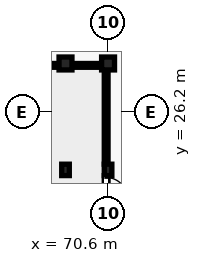
"""IFC4 building model, lengths in metres.
Left out: names, types, materials, properties, quantities, classifications, styles, units other than length and angle.
Written with IfcOpenShell. Run it as: python <this file> out.ifc"""

import sys

from ifc_helpers import new_model, si_unit, direction, frame, frame_2d, origin, origin_2d, place, context, subcontext, project, spatial, rectangle, extrude, element, fill, save


model = new_model("IFC4")
c1 = context("Model", 3, precision=1e-05, world=origin(), true_north=direction((0.0, 1.0)))
c2 = subcontext(c1, "Body", "Model", "MODEL_VIEW")
j1 = project(units=[si_unit("LENGTHUNIT", "METRE"), si_unit("PLANEANGLEUNIT", "RADIAN")], contexts=[c1])
p1 = place(None, origin())
s1 = spatial("IfcSite", under=j1, at=p1, CompositionType="ELEMENT")
p2 = place(p1, origin())
s2 = spatial("IfcBuilding", under=s1, at=p2, CompositionType="ELEMENT")
p3 = place(p2, origin())
s3 = spatial("IfcBuildingStorey", under=s2, at=p3, CompositionType="ELEMENT", Elevation=0.0)
p4 = place(p3, frame((67.8, 29.4, 0.0), z_axis=(0.0, 0.0, 1.0), x_axis=(1.0, 0.0, 0.0)))
e1 = element("IfcColumn", 1, at=p4, inside=s3, PredefinedType="COLUMN", context=c2, shape_type="SweptSolid", body=[
    extrude(rectangle(XDim=0.85, YDim=0.85, at=origin_2d()), origin(), (0.0, 0.0, 1.0), 4.15),
])
p5 = place(p3, frame((67.8, 22.4, 0.0), z_axis=(0.0, 0.0, 1.0), x_axis=(1.0, 0.0, 0.0)))
e2 = element("IfcColumn", 2, at=p5, inside=s3, PredefinedType="COLUMN", context=c2, shape_type="SweptSolid", body=[
    extrude(rectangle(XDim=0.5, YDim=0.75, at=origin_2d()), origin(), (0.0, 0.0, 1.0), 4.15),
])
p6 = place(p3, frame((70.6, 29.4, 0.0), z_axis=(0.0, 0.0, 1.0), x_axis=(1.0, 0.0, 0.0)))
e3 = element("IfcColumn", 3, at=p6, inside=s3, PredefinedType="COLUMN", context=c2, shape_type="SweptSolid", body=[
    extrude(rectangle(XDim=0.85, YDim=0.85, at=origin_2d()), origin(), (0.0, 0.0, 1.0), 4.15),
])
p7 = place(p3, frame((70.6, 22.4, 0.0), z_axis=(0.0, 0.0, 1.0), x_axis=(1.0, 0.0, 0.0)))
e4 = element("IfcColumn", 4, at=p7, inside=s3, PredefinedType="COLUMN", context=c2, shape_type="SweptSolid", body=[
    extrude(rectangle(XDim=0.5, YDim=0.75, at=origin_2d()), origin(), (0.0, 0.0, 1.0), 4.15),
])
p8 = place(p3, frame((65.0, 22.4, 0.0), z_axis=(0.0, 0.0, 1.0), x_axis=(1.0, 0.0, 0.0)))
e5 = element("IfcWall", 5, at=p8, inside=s3, PredefinedType="STANDARD", context=c2, shape_type="SweptSolid", body=[
    extrude(rectangle(XDim=2.8, YDim=0.2, at=frame_2d((1.4, 0.0))), origin(), (0.0, 0.0, 1.0), 3.492),
])
p9 = place(p8, frame((0.9, 0.0, 0.0)))
e6 = element("IfcOpeningElement", 6, at=p9, cuts=e5, PredefinedType="OPENING", context=c2, shape_type="SweptSolid", body=[
    extrude(rectangle(XDim=1.0, YDim=2.15, at=frame_2d((0.5, 1.075))), frame((0.0, 0.11, 0.0), z_axis=(0.0, -1.0, 0.0), x_axis=(1.0, 0.0, 0.0)), (0.0, 0.0, 1.0), 0.22),
])
p10 = place(p3, frame((67.8, 22.4, 0.0), z_axis=(0.0, 0.0, 1.0), x_axis=(1.0, 0.0, 0.0)))
e7 = element("IfcWall", 7, at=p10, inside=s3, PredefinedType="STANDARD", context=c2, shape_type="SweptSolid", body=[
    extrude(rectangle(XDim=2.8, YDim=0.2, at=frame_2d((1.4, 0.0))), origin(), (0.0, 0.0, 1.0), 3.492),
])
p11 = place(p3, frame((67.8, 29.2, 0.0), z_axis=(0.0, 0.0, 1.0), x_axis=(0.0, -1.0, 0.0)))
e8 = element("IfcWall", 8, at=p11, inside=s3, PredefinedType="PARTITIONING", context=c2, shape_type="SweptSolid", body=[
    extrude(rectangle(XDim=6.75, YDim=0.15, at=frame_2d((3.375, 0.0))), origin(), (0.0, 0.0, 1.0), 3.492),
])
p12 = place(p11, frame((2.925, 0.0, 0.0)))
e9 = element("IfcOpeningElement", 9, at=p12, cuts=e8, PredefinedType="OPENING", context=c2, shape_type="SweptSolid", body=[
    extrude(rectangle(XDim=0.9, YDim=2.1, at=frame_2d((0.45, 1.05))), frame((0.0, 0.085, 0.0), z_axis=(0.0, -1.0, 0.0), x_axis=(1.0, 0.0, 0.0)), (0.0, 0.0, 1.0), 0.17),
])
p13 = place(p3, frame((65.42, 29.275, 0.0), z_axis=(0.0, 0.0, 1.0), x_axis=(1.0, 0.0, 0.0)))
e10 = element("IfcWall", 10, at=p13, inside=s3, PredefinedType="STANDARD", context=c2, shape_type="SweptSolid", body=[
    extrude(rectangle(XDim=1.96, YDim=0.25, at=frame_2d((0.98, 0.0))), origin(), (0.0, 0.0, 1.0), 3.692),
])
p14 = place(p13, frame((0.38, 0.0, 0.88)))
e11 = element("IfcOpeningElement", 11, at=p14, cuts=e10, PredefinedType="OPENING", context=c2, shape_type="SweptSolid", body=[
    extrude(rectangle(XDim=1.2, YDim=1.5, at=frame_2d((0.6, 0.75))), frame((0.0, 0.135, 0.0), z_axis=(0.0, -1.0, 0.0), x_axis=(1.0, 0.0, 0.0)), (0.0, 0.0, 1.0), 0.27),
])
p15 = place(p3, frame((68.22, 29.275, 0.0), z_axis=(0.0, 0.0, 1.0), x_axis=(1.0, 0.0, 0.0)))
e12 = element("IfcWall", 12, at=p15, inside=s3, PredefinedType="STANDARD", context=c2, shape_type="SweptSolid", body=[
    extrude(rectangle(XDim=1.96, YDim=0.25, at=frame_2d((0.98, 0.0))), origin(), (0.0, 0.0, 1.0), 3.692),
])
p16 = place(p15, frame((0.38, 0.0, 0.88)))
e13 = element("IfcOpeningElement", 13, at=p16, cuts=e12, PredefinedType="OPENING", context=c2, shape_type="SweptSolid", body=[
    extrude(rectangle(XDim=1.2, YDim=1.5, at=frame_2d((0.6, 0.75))), frame((0.0, 0.135, 0.0), z_axis=(0.0, -1.0, 0.0), x_axis=(1.0, 0.0, 0.0)), (0.0, 0.0, 1.0), 0.27),
])
p17 = place(p3, frame((70.475, 28.98, 0.0), z_axis=(0.0, 0.0, 1.0), x_axis=(0.0, -1.0, 0.0)))
e14 = element("IfcWall", 14, at=p17, inside=s3, PredefinedType="STANDARD", context=c2, shape_type="SweptSolid", body=[
    extrude(rectangle(XDim=6.201, YDim=0.25, at=frame_2d((3.101, 0.0))), origin(), (0.0, 0.0, 1.0), 3.492),
])
p18 = place(p17, frame((2.33, 0.0, 0.88)))
e15 = element("IfcOpeningElement", 15, at=p18, cuts=e14, PredefinedType="OPENING", context=c2, shape_type="SweptSolid", body=[
    extrude(rectangle(XDim=1.5, YDim=1.65, at=frame_2d((0.75, 0.825))), frame((0.0, 0.135, 0.0), z_axis=(0.0, -1.0, 0.0), x_axis=(1.0, 0.0, 0.0)), (0.0, 0.0, 1.0), 0.27),
])
p19 = place(p3, frame((70.475, 22.021, 0.0), z_axis=(0.0, 0.0, 1.0), x_axis=(0.0, -1.0, 0.0)))
e16 = element("IfcWall", 16, at=p19, inside=s3, PredefinedType="STANDARD", context=c2, shape_type="SweptSolid", body=[
    extrude(rectangle(XDim=1.643, YDim=0.25, at=frame_2d((0.822, 0.0))), origin(), (0.0, 0.0, 1.0), 3.492),
])
p20 = place(p19, frame((0.123, 0.0, 0.0)))
e17 = element("IfcOpeningElement", 17, at=p20, cuts=e16, PredefinedType="OPENING", context=c2, shape_type="SweptSolid", body=[
    extrude(rectangle(XDim=1.4, YDim=2.15, at=frame_2d((0.7, 1.075))), frame((0.0, 0.135, 0.0), z_axis=(0.0, -1.0, 0.0), x_axis=(1.0, 0.0, 0.0)), (0.0, 0.0, 1.0), 0.27),
])
p21 = place(p14, origin())
e18 = element("IfcWindow", 18, at=p21, inside=s3, PartitioningType="SINGLE_PANEL", PredefinedType="WINDOW", context=c2, shape_type="SweptSolid", body=[
    extrude(rectangle(XDim=1.2, YDim=1.5, at=frame_2d((0.6, 0.75))), frame((0.0, 0.03, 0.0), z_axis=(0.0, -1.0, 0.0), x_axis=(1.0, 0.0, 0.0)), (0.0, 0.0, 1.0), 0.06),
])
fill(e11, e18)
p22 = place(p16, origin())
e19 = element("IfcWindow", 19, at=p22, inside=s3, PartitioningType="SINGLE_PANEL", PredefinedType="WINDOW", context=c2, shape_type="SweptSolid", body=[
    extrude(rectangle(XDim=1.2, YDim=1.5, at=frame_2d((0.6, 0.75))), frame((0.0, 0.03, 0.0), z_axis=(0.0, -1.0, 0.0), x_axis=(1.0, 0.0, 0.0)), (0.0, 0.0, 1.0), 0.06),
])
fill(e13, e19)
p23 = place(p18, origin())
e20 = element("IfcWindow", 20, at=p23, inside=s3, PartitioningType="DOUBLE_PANEL_VERTICAL", PredefinedType="WINDOW", context=c2, shape_type="SweptSolid", body=[
    extrude(rectangle(XDim=1.5, YDim=1.65, at=frame_2d((0.75, 0.825))), frame((0.0, 0.03, 0.0), z_axis=(0.0, -1.0, 0.0), x_axis=(1.0, 0.0, 0.0)), (0.0, 0.0, 1.0), 0.06),
])
fill(e15, e20)
p24 = place(p12, frame((0.9, 0.0, 0.0), z_axis=(0.0, 0.0, 1.0), x_axis=(-1.0, 0.0, 0.0)))
e21 = element("IfcDoor", 21, at=p24, inside=s3, OperationType="SINGLE_SWING_RIGHT", PredefinedType="DOOR", context=c2, shape_type="SweptSolid", body=[
    extrude(rectangle(XDim=0.9, YDim=2.1, at=frame_2d((0.45, 1.05))), frame((0.0, 0.025, 0.0), z_axis=(0.0, -1.0, 0.0), x_axis=(1.0, 0.0, 0.0)), (0.0, 0.0, 1.0), 0.05),
])
fill(e9, e21)
p25 = place(p20, origin())
e22 = element("IfcDoor", 22, at=p25, inside=s3, OperationType="SINGLE_SWING_RIGHT", PredefinedType="DOOR", context=c2, shape_type="SweptSolid", body=[
    extrude(rectangle(XDim=1.4, YDim=2.15, at=frame_2d((0.7, 1.075))), frame((0.0, 0.025, 0.0), z_axis=(0.0, -1.0, 0.0), x_axis=(1.0, 0.0, 0.0)), (0.0, 0.0, 1.0), 0.05),
])
fill(e17, e22)
save(model, sys.argv[1])
